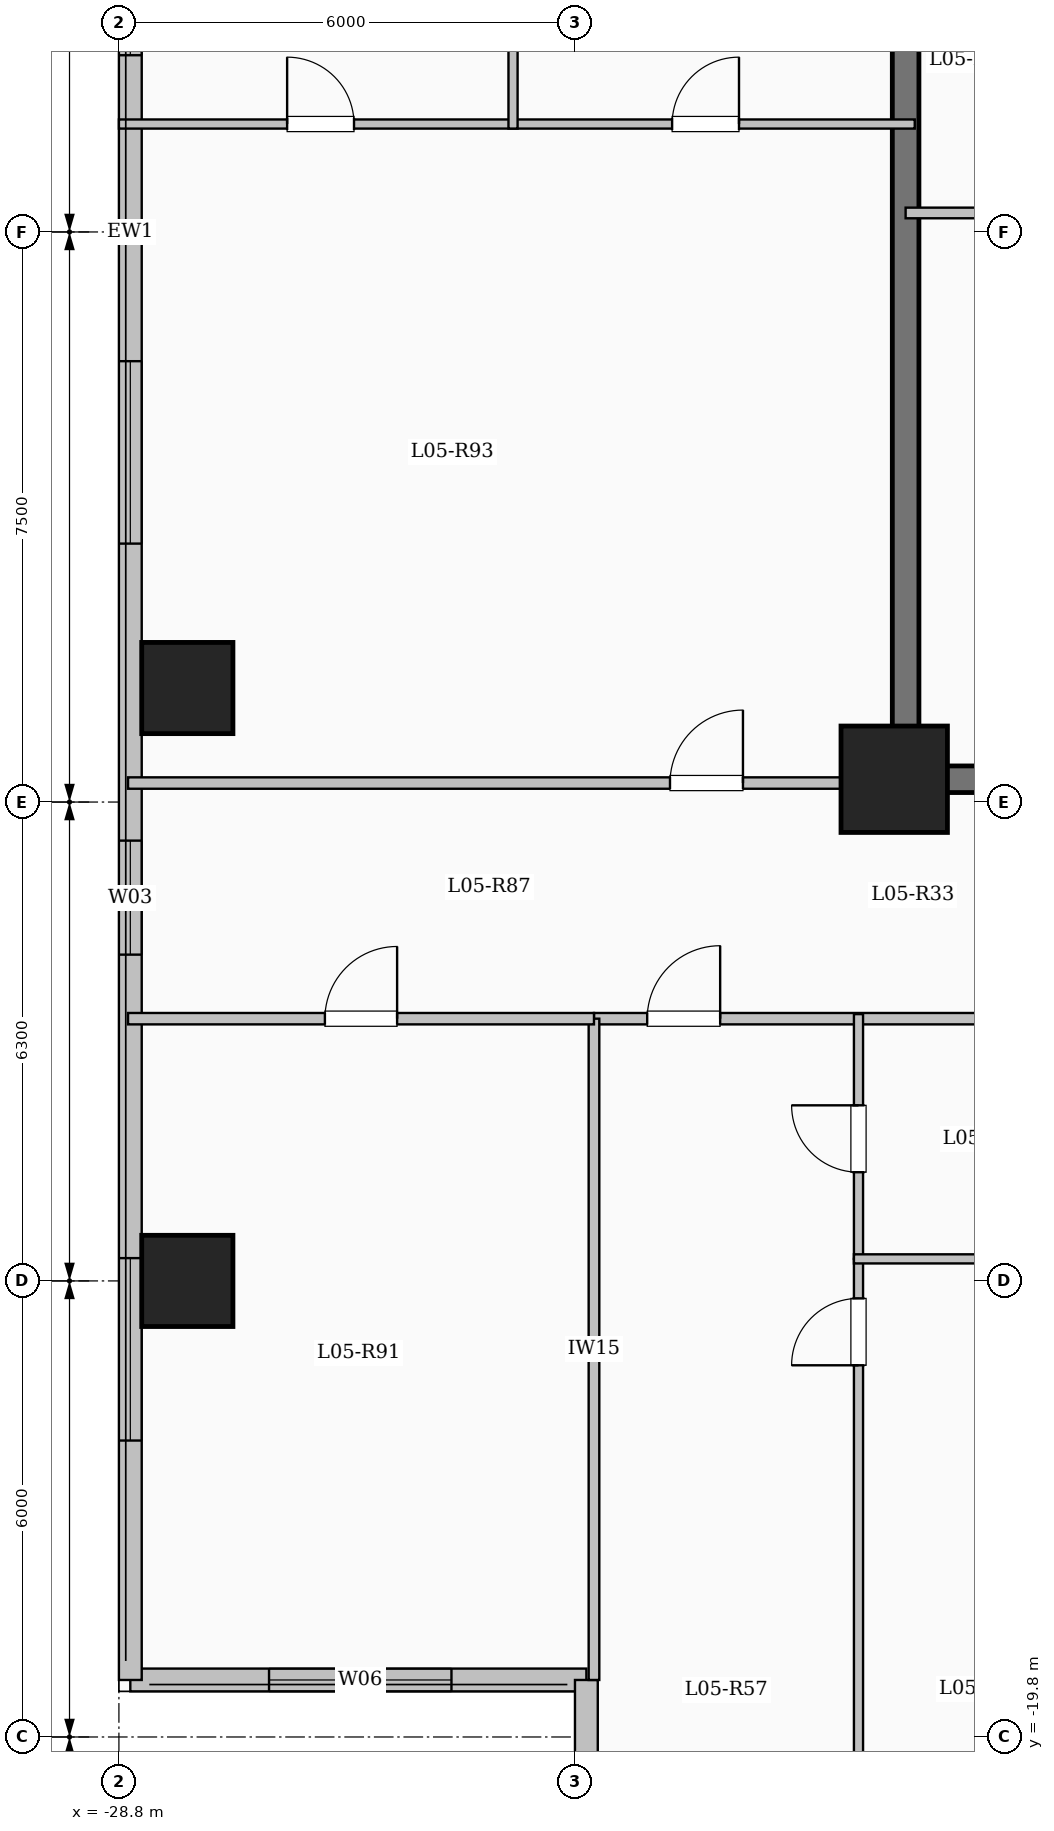
"""IFC4 building model, lengths in metres.
Left out: names, types, materials, properties, quantities, classifications, styles, units other than length and angle.
Written with IfcOpenShell. Run it as: python <this file> out.ifc"""

import sys

from ifc_helpers import new_model, si_unit, direction, frame, frame_2d, origin, origin_2d, place, context, subcontext, project, spatial, rectangle, extrude, element, fill, save


model = new_model("IFC4")
c1 = context("Model", 3, precision=1e-05, world=origin(), true_north=direction((0.0, 1.0)))
c2 = subcontext(c1, "Body", "Model", "MODEL_VIEW")
j1 = project(units=[si_unit("LENGTHUNIT", "METRE"), si_unit("PLANEANGLEUNIT", "RADIAN")], contexts=[c1])
p1 = place(None, origin())
s1 = spatial("IfcSite", under=j1, at=p1, CompositionType="ELEMENT")
p2 = place(p1, origin())
s2 = spatial("IfcBuilding", under=s1, at=p2, CompositionType="ELEMENT")
p3 = place(p2, frame((0.0, 0.0, 24.0)))
s3 = spatial("IfcBuildingStorey", under=s2, at=p3, CompositionType="ELEMENT", Elevation=24.0)
p4 = place(p3, frame((-18.6, -7.2, 0.0), z_axis=(0.0, 0.0, 1.0), x_axis=(1.0, 0.0, 0.0)))
e1 = element("IfcColumn", 1, at=p4, inside=s3, PredefinedType="COLUMN", context=c2, shape_type="SweptSolid", body=[
    extrude(rectangle(XDim=1.4, YDim=1.4, at=origin_2d()), origin(), (0.0, 0.0, 1.0), 3.35),
])
for number, where, z_axis, x_axis in (
    (2, (-27.9, -13.8, 0.0), (0.0, 0.0, 1.0), (1.0, 0.0, 0.0)),
    (3, (-27.9, -6.0, 0.0), (0.0, 0.0, 1.0), (1.0, 0.0, 0.0)),
):
    element("IfcColumn", number, at=place(p3, frame(where, z_axis=z_axis, x_axis=x_axis)), inside=s3, PredefinedType="COLUMN", context=c2, shape_type="SweptSolid", body=[
        extrude(rectangle(XDim=1.2, YDim=1.2, at=origin_2d()), origin(), (0.0, 0.0, 1.0), 3.35),
    ])
p5 = place(p3, frame((-22.65, -19.05, 0.0), z_axis=(0.0, 0.0, 1.0), x_axis=(-1.0, 0.0, 0.0)))
e4 = element("IfcWall", 4, at=p5, inside=s3, PredefinedType="SOLIDWALL", context=c2, shape_type="SweptSolid", body=[
    extrude(rectangle(XDim=6.0, YDim=0.3, at=frame_2d((3.0, 0.0))), origin(), (0.0, 0.0, 1.0), 3.1),
])
p6 = place(p5, frame((1.775, 0.0, 0.9)))
e5 = element("IfcOpeningElement", 5, at=p6, cuts=e4, PredefinedType="OPENING", context=c2, shape_type="SweptSolid", body=[
    extrude(rectangle(XDim=2.4, YDim=1.8, at=frame_2d((1.2, 0.9))), frame((0.0, 0.16, 0.0), z_axis=(0.0, -1.0, 0.0), x_axis=(1.0, 0.0, 0.0)), (0.0, 0.0, 1.0), 0.32),
])
p7 = place(p3, frame((-28.65, -19.05, 0.0), z_axis=(0.0, 0.0, 1.0), x_axis=(0.0, 1.0, 0.0)))
e6 = element("IfcWall", 6, at=p7, inside=s3, PredefinedType="SOLIDWALL", context=c2, shape_type="SweptSolid", body=[
    extrude(rectangle(XDim=38.1, YDim=0.3, at=frame_2d((19.05, 0.0))), origin(), (0.0, 0.0, 1.0), 3.1),
])
p8 = place(p7, frame((3.15, 0.0, 0.9)))
e7 = element("IfcOpeningElement", 7, at=p8, cuts=e6, PredefinedType="OPENING", context=c2, shape_type="SweptSolid", body=[
    extrude(rectangle(XDim=2.4, YDim=1.8, at=frame_2d((1.2, 0.9))), frame((0.0, 0.16, 0.0), z_axis=(0.0, -1.0, 0.0), x_axis=(1.0, 0.0, 0.0)), (0.0, 0.0, 1.0), 0.32),
])
p9 = place(p7, frame((9.542, 0.0, 0.9)))
e8 = element("IfcOpeningElement", 8, at=p9, cuts=e6, PredefinedType="OPENING", context=c2, shape_type="SweptSolid", body=[
    extrude(rectangle(XDim=1.5, YDim=1.65, at=frame_2d((0.75, 0.825))), frame((0.0, 0.16, 0.0), z_axis=(0.0, -1.0, 0.0), x_axis=(1.0, 0.0, 0.0)), (0.0, 0.0, 1.0), 0.32),
])
p10 = place(p7, frame((14.95, 0.0, 0.9)))
e9 = element("IfcOpeningElement", 9, at=p10, cuts=e6, PredefinedType="OPENING", context=c2, shape_type="SweptSolid", body=[
    extrude(rectangle(XDim=2.4, YDim=1.8, at=frame_2d((1.2, 0.9))), frame((0.0, 0.16, 0.0), z_axis=(0.0, -1.0, 0.0), x_axis=(1.0, 0.0, 0.0)), (0.0, 0.0, 1.0), 0.32),
])
p11 = place(p7, frame((21.375, 0.0, 0.9)))
e10 = element("IfcOpeningElement", 10, at=p11, cuts=e6, PredefinedType="OPENING", context=c2, shape_type="SweptSolid", body=[
    extrude(rectangle(XDim=1.8, YDim=1.65, at=frame_2d((0.9, 0.825))), frame((0.0, 0.16, 0.0), z_axis=(0.0, -1.0, 0.0), x_axis=(1.0, 0.0, 0.0)), (0.0, 0.0, 1.0), 0.32),
])
p12 = place(p7, frame((25.925, 0.0, 0.9)))
e11 = element("IfcOpeningElement", 11, at=p12, cuts=e6, PredefinedType="OPENING", context=c2, shape_type="SweptSolid", body=[
    extrude(rectangle(XDim=2.0, YDim=1.7, at=frame_2d((1.0, 0.85))), frame((0.0, 0.16, 0.0), z_axis=(0.0, -1.0, 0.0), x_axis=(1.0, 0.0, 0.0)), (0.0, 0.0, 1.0), 0.32),
])
p13 = place(p7, frame((30.175, 0.0, 0.95)))
e12 = element("IfcOpeningElement", 12, at=p13, cuts=e6, PredefinedType="OPENING", context=c2, shape_type="SweptSolid", body=[
    extrude(rectangle(XDim=1.0, YDim=1.5, at=frame_2d((0.5, 0.75))), frame((0.0, 0.16, 0.0), z_axis=(0.0, -1.0, 0.0), x_axis=(1.0, 0.0, 0.0)), (0.0, 0.0, 1.0), 0.32),
])
p14 = place(p7, frame((33.85, 0.0, 0.9)))
e13 = element("IfcOpeningElement", 13, at=p14, cuts=e6, PredefinedType="OPENING", context=c2, shape_type="SweptSolid", body=[
    extrude(rectangle(XDim=2.0, YDim=1.7, at=frame_2d((1.0, 0.85))), frame((0.0, 0.16, 0.0), z_axis=(0.0, -1.0, 0.0), x_axis=(1.0, 0.0, 0.0)), (0.0, 0.0, 1.0), 0.32),
])
p15 = place(p3, frame((-22.65, -23.55, 0.0), z_axis=(0.0, 0.0, 1.0), x_axis=(0.0, 1.0, 0.0)))
e14 = element("IfcWall", 14, at=p15, inside=s3, PredefinedType="SOLIDWALL", context=c2, shape_type="SweptSolid", body=[
    extrude(rectangle(XDim=4.5, YDim=0.3, at=frame_2d((2.25, 0.0))), origin(), (0.0, 0.0, 1.0), 3.1),
])
p16 = place(p15, frame((1.067, 0.0, 0.9)))
e15 = element("IfcOpeningElement", 15, at=p16, cuts=e14, PredefinedType="OPENING", context=c2, shape_type="SweptSolid", body=[
    extrude(rectangle(XDim=2.4, YDim=1.8, at=frame_2d((1.2, 0.9))), frame((0.0, 0.16, 0.0), z_axis=(0.0, -1.0, 0.0), x_axis=(1.0, 0.0, 0.0)), (0.0, 0.0, 1.0), 0.32),
])
p17 = place(p3, frame((-18.45, -7.375, 0.0), z_axis=(0.0, 0.0, 1.0), x_axis=(0.0, 1.0, 0.0)))
e16 = element("IfcWall", 16, at=p17, inside=s3, PredefinedType="SHEAR", context=c2, shape_type="SweptSolid", body=[
    extrude(rectangle(XDim=14.05, YDim=0.35, at=frame_2d((7.025, 0.0))), origin(), (0.0, 0.0, 1.0), 3.35),
])
p18 = place(p3, frame((-18.625, -7.2, 0.0), z_axis=(0.0, 0.0, 1.0), x_axis=(1.0, 0.0, 0.0)))
e17 = element("IfcWall", 17, at=p18, inside=s3, PredefinedType="SHEAR", context=c2, shape_type="SweptSolid", body=[
    extrude(rectangle(XDim=8.55, YDim=0.35, at=frame_2d((4.275, 0.0))), origin(), (0.0, 0.0, 1.0), 3.35),
])
p19 = place(p3, frame((-18.45, 0.25, 0.0), z_axis=(0.0, 0.0, 1.0), x_axis=(1.0, 0.0, 0.0)))
e18 = element("IfcWall", 18, at=p19, inside=s3, PredefinedType="PARTITIONING", context=c2, shape_type="SweptSolid", body=[
    extrude(rectangle(XDim=3.05, YDim=0.14, at=frame_2d((1.525, 0.0))), origin(), (0.0, 0.0, 1.0), 3.1),
])
p20 = place(p19, frame((1.05, 0.0, 0.0)))
e19 = element("IfcOpeningElement", 19, at=p20, cuts=e18, PredefinedType="OPENING", context=c2, shape_type="SweptSolid", body=[
    extrude(rectangle(XDim=0.9, YDim=2.08, at=frame_2d((0.45, 1.04))), frame((0.0, 0.08, 0.0), z_axis=(0.0, -1.0, 0.0), x_axis=(1.0, 0.0, 0.0)), (0.0, 0.0, 1.0), 0.16),
])
p21 = place(p3, frame((-22.55, -10.35, 0.0), z_axis=(0.0, 0.0, 1.0), x_axis=(1.0, 0.0, 0.0)))
e20 = element("IfcWall", 20, at=p21, inside=s3, PredefinedType="PARTITIONING", context=c2, shape_type="SweptSolid", body=[
    extrude(rectangle(XDim=14.0, YDim=0.15, at=frame_2d((7.0, 0.0))), origin(), (0.0, 0.0, 1.0), 3.1),
])
p22 = place(p21, frame((0.7, 0.0, 0.0)))
e21 = element("IfcOpeningElement", 21, at=p22, cuts=e20, PredefinedType="OPENING", context=c2, shape_type="SweptSolid", body=[
    extrude(rectangle(XDim=0.96, YDim=2.15, at=frame_2d((0.48, 1.075))), frame((0.0, 0.085, 0.0), z_axis=(0.0, -1.0, 0.0), x_axis=(1.0, 0.0, 0.0)), (0.0, 0.0, 1.0), 0.17),
])
p23 = place(p21, frame((7.396, 0.0, 0.0)))
e22 = element("IfcOpeningElement", 22, at=p23, cuts=e20, PredefinedType="OPENING", context=c2, shape_type="SweptSolid", body=[
    extrude(rectangle(XDim=0.96, YDim=2.15, at=frame_2d((0.48, 1.075))), frame((0.0, 0.085, 0.0), z_axis=(0.0, -1.0, 0.0), x_axis=(1.0, 0.0, 0.0)), (0.0, 0.0, 1.0), 0.17),
])
p24 = place(p3, frame((-19.07, -23.6, 0.0), z_axis=(0.0, 0.0, 1.0), x_axis=(0.0, 1.0, 0.0)))
e23 = element("IfcWall", 23, at=p24, inside=s3, PredefinedType="PARTITIONING", context=c2, shape_type="SweptSolid", body=[
    extrude(rectangle(XDim=10.09, YDim=0.12, at=frame_2d((5.045, 0.0))), origin(), (0.0, 0.0, 1.0), 3.1),
])
p25 = place(p24, frame((8.69, 0.0, 0.0)))
e24 = element("IfcOpeningElement", 24, at=p25, cuts=e23, PredefinedType="OPENING", context=c2, shape_type="SweptSolid", body=[
    extrude(rectangle(XDim=0.88, YDim=2.1, at=frame_2d((0.44, 1.05))), frame((0.0, 0.07, 0.0), z_axis=(0.0, -1.0, 0.0), x_axis=(1.0, 0.0, 0.0)), (0.0, 0.0, 1.0), 0.14),
])
p26 = place(p3, frame((-19.07, -13.51, 0.0), z_axis=(0.0, 0.0, 1.0), x_axis=(0.0, 1.0, 0.0)))
e25 = element("IfcWall", 25, at=p26, inside=s3, PredefinedType="PARTITIONING", context=c2, shape_type="SweptSolid", body=[
    extrude(rectangle(XDim=3.22, YDim=0.12, at=frame_2d((1.61, 0.0))), origin(), (0.0, 0.0, 1.0), 3.1),
])
p27 = place(p26, frame((1.14, 0.0, 0.0)))
e26 = element("IfcOpeningElement", 26, at=p27, cuts=e25, PredefinedType="OPENING", context=c2, shape_type="SweptSolid", body=[
    extrude(rectangle(XDim=0.88, YDim=2.1, at=frame_2d((0.44, 1.05))), frame((0.0, 0.07, 0.0), z_axis=(0.0, -1.0, 0.0), x_axis=(1.0, 0.0, 0.0)), (0.0, 0.0, 1.0), 0.14),
])
p28 = place(p3, frame((-19.13, -13.51, 0.0), z_axis=(0.0, 0.0, 1.0), x_axis=(1.0, 0.0, 0.0)))
e27 = element("IfcWall", 27, at=p28, inside=s3, PredefinedType="PARTITIONING", context=c2, shape_type="SweptSolid", body=[
    extrude(rectangle(XDim=3.336, YDim=0.12, at=frame_2d((1.668, 0.0))), origin(), (0.0, 0.0, 1.0), 3.1),
])
p29 = place(p3, frame((-28.68, -7.25, 0.0), z_axis=(0.0, 0.0, 1.0), x_axis=(1.0, 0.0, 0.0)))
e28 = element("IfcWall", 28, at=p29, inside=s3, PredefinedType="PARTITIONING", context=c2, shape_type="SweptSolid", body=[
    extrude(rectangle(XDim=10.23, YDim=0.15, at=frame_2d((5.115, 0.0))), origin(), (0.0, 0.0, 1.0), 3.1),
])
p30 = place(p29, frame((7.13, 0.0, 0.0)))
e29 = element("IfcOpeningElement", 29, at=p30, cuts=e28, PredefinedType="OPENING", context=c2, shape_type="SweptSolid", body=[
    extrude(rectangle(XDim=0.96, YDim=2.15, at=frame_2d((0.48, 1.075))), frame((0.0, 0.085, 0.0), z_axis=(0.0, -1.0, 0.0), x_axis=(1.0, 0.0, 0.0)), (0.0, 0.0, 1.0), 0.17),
])
p31 = place(p3, frame((-22.55, -19.05, 0.0), z_axis=(0.0, 0.0, 1.0), x_axis=(0.0, 1.0, 0.0)))
e30 = element("IfcWall", 30, at=p31, inside=s3, PredefinedType="PARTITIONING", context=c2, shape_type="SweptSolid", body=[
    extrude(rectangle(XDim=8.7, YDim=0.14, at=frame_2d((4.35, 0.0))), origin(), (0.0, 0.0, 1.0), 3.1),
])
p32 = place(p3, frame((-28.68, -10.35, 0.0), z_axis=(0.0, 0.0, 1.0), x_axis=(1.0, 0.0, 0.0)))
e31 = element("IfcWall", 31, at=p32, inside=s3, PredefinedType="PARTITIONING", context=c2, shape_type="SweptSolid", body=[
    extrude(rectangle(XDim=6.13, YDim=0.15, at=frame_2d((3.065, 0.0))), origin(), (0.0, 0.0, 1.0), 3.1),
])
p33 = place(p32, frame((2.59, 0.0, 0.0)))
e32 = element("IfcOpeningElement", 32, at=p33, cuts=e31, PredefinedType="OPENING", context=c2, shape_type="SweptSolid", body=[
    extrude(rectangle(XDim=0.95, YDim=2.15, at=frame_2d((0.475, 1.075))), frame((0.0, 0.085, 0.0), z_axis=(0.0, -1.0, 0.0), x_axis=(1.0, 0.0, 0.0)), (0.0, 0.0, 1.0), 0.17),
])
p34 = place(p3, frame((-28.8, 1.42, 0.0), z_axis=(0.0, 0.0, 1.0), x_axis=(1.0, 0.0, 0.0)))
e33 = element("IfcWall", 33, at=p34, inside=s3, PredefinedType="PARTITIONING", context=c2, shape_type="SweptSolid", body=[
    extrude(rectangle(XDim=10.47, YDim=0.12, at=frame_2d((5.235, 0.0))), origin(), (0.0, 0.0, 1.0), 3.1),
])
p35 = place(p34, frame((2.213, 0.0, 0.0)))
e34 = element("IfcOpeningElement", 34, at=p35, cuts=e33, PredefinedType="OPENING", context=c2, shape_type="SweptSolid", body=[
    extrude(rectangle(XDim=0.88, YDim=2.1, at=frame_2d((0.44, 1.05))), frame((0.0, 0.07, 0.0), z_axis=(0.0, -1.0, 0.0), x_axis=(1.0, 0.0, 0.0)), (0.0, 0.0, 1.0), 0.14),
])
p36 = place(p34, frame((7.278, 0.0, 0.0)))
e35 = element("IfcOpeningElement", 35, at=p36, cuts=e33, PredefinedType="OPENING", context=c2, shape_type="SweptSolid", body=[
    extrude(rectangle(XDim=0.88, YDim=2.1, at=frame_2d((0.44, 1.05))), frame((0.0, 0.07, 0.0), z_axis=(0.0, -1.0, 0.0), x_axis=(1.0, 0.0, 0.0)), (0.0, 0.0, 1.0), 0.14),
])
p37 = place(p3, frame((-23.615, 1.36, 0.0), z_axis=(0.0, 0.0, 1.0), x_axis=(0.0, 1.0, 0.0)))
e36 = element("IfcWall", 36, at=p37, inside=s3, PredefinedType="PARTITIONING", context=c2, shape_type="SweptSolid", body=[
    extrude(rectangle(XDim=3.58, YDim=0.12, at=frame_2d((1.79, 0.0))), origin(), (0.0, 0.0, 1.0), 3.1),
])
p38 = place(p6, origin())
e37 = element("IfcWindow", 37, at=p38, inside=s3, PartitioningType="SINGLE_PANEL", PredefinedType="WINDOW", context=c2, shape_type="SweptSolid", body=[
    extrude(rectangle(XDim=2.4, YDim=1.8, at=frame_2d((1.2, 0.9))), frame((0.0, 0.03, 0.0), z_axis=(0.0, -1.0, 0.0), x_axis=(1.0, 0.0, 0.0)), (0.0, 0.0, 1.0), 0.06),
])
fill(e5, e37)
p39 = place(p8, origin())
e38 = element("IfcWindow", 38, at=p39, inside=s3, PartitioningType="SINGLE_PANEL", PredefinedType="WINDOW", context=c2, shape_type="SweptSolid", body=[
    extrude(rectangle(XDim=2.4, YDim=1.8, at=frame_2d((1.2, 0.9))), frame((0.0, 0.03, 0.0), z_axis=(0.0, -1.0, 0.0), x_axis=(1.0, 0.0, 0.0)), (0.0, 0.0, 1.0), 0.06),
])
fill(e7, e38)
p40 = place(p9, origin())
e39 = element("IfcWindow", 39, at=p40, inside=s3, PartitioningType="SINGLE_PANEL", PredefinedType="WINDOW", context=c2, shape_type="SweptSolid", body=[
    extrude(rectangle(XDim=1.5, YDim=1.65, at=frame_2d((0.75, 0.825))), frame((0.0, 0.03, 0.0), z_axis=(0.0, -1.0, 0.0), x_axis=(1.0, 0.0, 0.0)), (0.0, 0.0, 1.0), 0.06),
])
fill(e8, e39)
p41 = place(p10, origin())
e40 = element("IfcWindow", 40, at=p41, inside=s3, PartitioningType="SINGLE_PANEL", PredefinedType="WINDOW", context=c2, shape_type="SweptSolid", body=[
    extrude(rectangle(XDim=2.4, YDim=1.8, at=frame_2d((1.2, 0.9))), frame((0.0, 0.03, 0.0), z_axis=(0.0, -1.0, 0.0), x_axis=(1.0, 0.0, 0.0)), (0.0, 0.0, 1.0), 0.06),
])
fill(e9, e40)
p42 = place(p11, origin())
e41 = element("IfcWindow", 41, at=p42, inside=s3, PartitioningType="SINGLE_PANEL", PredefinedType="WINDOW", context=c2, shape_type="SweptSolid", body=[
    extrude(rectangle(XDim=1.8, YDim=1.65, at=frame_2d((0.9, 0.825))), frame((0.0, 0.03, 0.0), z_axis=(0.0, -1.0, 0.0), x_axis=(1.0, 0.0, 0.0)), (0.0, 0.0, 1.0), 0.06),
])
fill(e10, e41)
p43 = place(p22, origin())
e42 = element("IfcDoor", 42, at=p43, inside=s3, OperationType="SINGLE_SWING_RIGHT", PredefinedType="DOOR", context=c2, shape_type="SweptSolid", body=[
    extrude(rectangle(XDim=0.96, YDim=2.15, at=frame_2d((0.48, 1.075))), frame((0.0, 0.025, 0.0), z_axis=(0.0, -1.0, 0.0), x_axis=(1.0, 0.0, 0.0)), (0.0, 0.0, 1.0), 0.05),
])
fill(e21, e42)
p44 = place(p25, origin())
e43 = element("IfcDoor", 43, at=p44, inside=s3, OperationType="SINGLE_SWING_LEFT", PredefinedType="DOOR", context=c2, shape_type="SweptSolid", body=[
    extrude(rectangle(XDim=0.88, YDim=2.1, at=frame_2d((0.44, 1.05))), frame((0.0, 0.025, 0.0), z_axis=(0.0, -1.0, 0.0), x_axis=(1.0, 0.0, 0.0)), (0.0, 0.0, 1.0), 0.05),
])
fill(e24, e43)
p45 = place(p27, origin())
e44 = element("IfcDoor", 44, at=p45, inside=s3, OperationType="SINGLE_SWING_RIGHT", PredefinedType="DOOR", context=c2, shape_type="SweptSolid", body=[
    extrude(rectangle(XDim=0.88, YDim=2.1, at=frame_2d((0.44, 1.05))), frame((0.0, 0.025, 0.0), z_axis=(0.0, -1.0, 0.0), x_axis=(1.0, 0.0, 0.0)), (0.0, 0.0, 1.0), 0.05),
])
fill(e26, e44)
p46 = place(p33, origin())
e45 = element("IfcDoor", 45, at=p46, inside=s3, OperationType="SINGLE_SWING_RIGHT", PredefinedType="DOOR", context=c2, shape_type="SweptSolid", body=[
    extrude(rectangle(XDim=0.95, YDim=2.15, at=frame_2d((0.475, 1.075))), frame((0.0, 0.025, 0.0), z_axis=(0.0, -1.0, 0.0), x_axis=(1.0, 0.0, 0.0)), (0.0, 0.0, 1.0), 0.05),
])
fill(e32, e45)
p47 = place(p30, origin())
e46 = element("IfcDoor", 46, at=p47, inside=s3, OperationType="SINGLE_SWING_RIGHT", PredefinedType="DOOR", context=c2, shape_type="SweptSolid", body=[
    extrude(rectangle(XDim=0.96, YDim=2.15, at=frame_2d((0.48, 1.075))), frame((0.0, 0.025, 0.0), z_axis=(0.0, -1.0, 0.0), x_axis=(1.0, 0.0, 0.0)), (0.0, 0.0, 1.0), 0.05),
])
fill(e29, e46)
p48 = place(p35, origin())
e47 = element("IfcDoor", 47, at=p48, inside=s3, OperationType="SINGLE_SWING_LEFT", PredefinedType="DOOR", context=c2, shape_type="SweptSolid", body=[
    extrude(rectangle(XDim=0.88, YDim=2.1, at=frame_2d((0.44, 1.05))), frame((0.0, 0.025, 0.0), z_axis=(0.0, -1.0, 0.0), x_axis=(1.0, 0.0, 0.0)), (0.0, 0.0, 1.0), 0.05),
])
fill(e34, e47)
p49 = place(p36, origin())
e48 = element("IfcDoor", 48, at=p49, inside=s3, OperationType="SINGLE_SWING_RIGHT", PredefinedType="DOOR", context=c2, shape_type="SweptSolid", body=[
    extrude(rectangle(XDim=0.88, YDim=2.1, at=frame_2d((0.44, 1.05))), frame((0.0, 0.025, 0.0), z_axis=(0.0, -1.0, 0.0), x_axis=(1.0, 0.0, 0.0)), (0.0, 0.0, 1.0), 0.05),
])
fill(e35, e48)
save(model, sys.argv[1])
